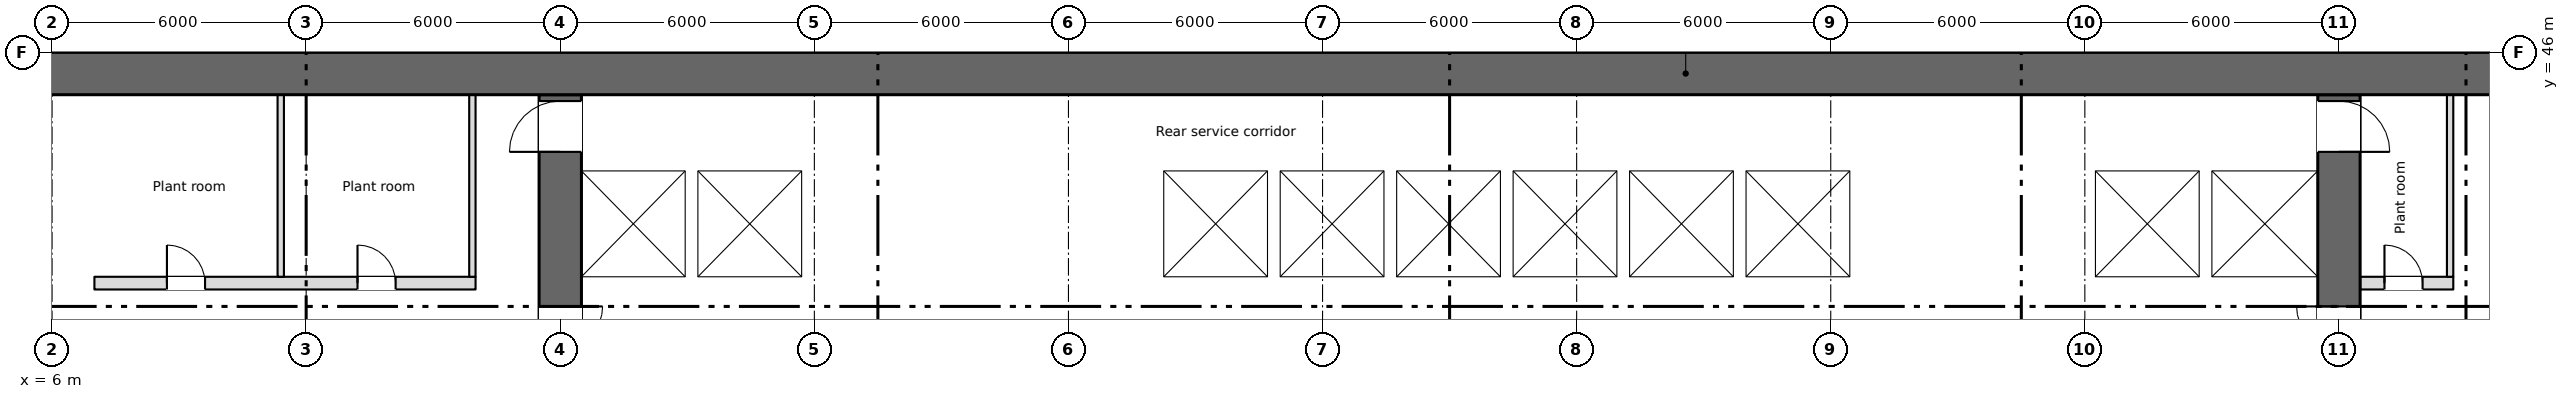
"""IFC4 building model, lengths in metres.
Left out: names, types, materials, properties, quantities, classifications, styles, units other than length and angle.
Written with IfcOpenShell. Run it as: python <this file> out.ifc"""

import sys

from ifc_helpers import new_model, si_unit, direction, frame, frame_2d, origin, place, context, subcontext, project, spatial, rectangle, extrude, element, fill, save


model = new_model("IFC4")
c1 = context("Model", 3, precision=1e-05, world=origin(), true_north=direction((0.0, 1.0)))
c2 = subcontext(c1, "Body", "Model", "MODEL_VIEW")
j1 = project(units=[si_unit("LENGTHUNIT", "METRE"), si_unit("PLANEANGLEUNIT", "RADIAN")], contexts=[c1])
p1 = place(None, origin())
s1 = spatial("IfcSite", under=j1, at=p1, CompositionType="ELEMENT")
p2 = place(p1, origin())
s2 = spatial("IfcBuilding", under=s1, at=p2, CompositionType="ELEMENT")
p3 = place(p2, frame((0.0, 0.0, 90.0)))
s3 = spatial("IfcBuildingStorey", under=s2, at=p3, CompositionType="ELEMENT", Elevation=90.0)
p4 = place(p3, frame((5.55, 45.5, 0.0), z_axis=(0.0, 0.0, 1.0), x_axis=(1.0, 0.0, 0.0)))
e1 = element("IfcWall", 1, at=p4, inside=s3, PredefinedType="SHEAR", context=c2, shape_type="SweptSolid", body=[
    extrude(rectangle(XDim=66.9, YDim=1.0, at=frame_2d((33.45, 0.0))), origin(), (0.0, 0.0, 1.0), 4.2),
])
p5 = place(p3, frame((6.85, 28.4, 0.0), z_axis=(0.0, 0.0, 1.0), x_axis=(0.0, 1.0, 0.0)))
e2 = element("IfcWall", 2, at=p5, inside=s3, PredefinedType="SHEAR", context=c2, shape_type="SweptSolid", body=[
    extrude(rectangle(XDim=16.6, YDim=0.3, at=frame_2d((8.3, 0.0))), origin(), (0.0, 0.0, 1.0), 4.2),
])
p6 = place(p3, frame((18.0, 28.4, 0.0), z_axis=(0.0, 0.0, 1.0), x_axis=(0.0, 1.0, 0.0)))
e3 = element("IfcWall", 3, at=p6, inside=s3, PredefinedType="SHEAR", context=c2, shape_type="SweptSolid", body=[
    extrude(rectangle(XDim=16.6, YDim=1.0, at=frame_2d((8.3, 0.0))), origin(), (0.0, 0.0, 1.0), 4.2),
])
p7 = place(p6, frame((9.6, 0.0, 0.0)))
e4 = element("IfcOpeningElement", 4, at=p7, cuts=e3, PredefinedType="OPENING", context=c2, shape_type="SweptSolid", body=[
    extrude(rectangle(XDim=2.0, YDim=2.1, at=frame_2d((1.0, 1.05))), frame((0.0, 0.51, 0.0), z_axis=(0.0, -1.0, 0.0), x_axis=(1.0, 0.0, 0.0)), (0.0, 0.0, 1.0), 1.02),
])
p8 = place(p6, frame((15.25, 0.0, 0.0)))
e5 = element("IfcOpeningElement", 5, at=p8, cuts=e3, PredefinedType="OPENING", context=c2, shape_type="SweptSolid", body=[
    extrude(rectangle(XDim=1.2, YDim=2.1, at=frame_2d((0.6, 1.05))), frame((0.0, 0.51, 0.0), z_axis=(0.0, -1.0, 0.0), x_axis=(1.0, 0.0, 0.0)), (0.0, 0.0, 1.0), 1.02),
])
p9 = place(p3, frame((60.0, 28.4, 0.0), z_axis=(0.0, 0.0, 1.0), x_axis=(0.0, 1.0, 0.0)))
e6 = element("IfcWall", 6, at=p9, inside=s3, PredefinedType="SHEAR", context=c2, shape_type="SweptSolid", body=[
    extrude(rectangle(XDim=16.6, YDim=1.0, at=frame_2d((8.3, 0.0))), origin(), (0.0, 0.0, 1.0), 4.2),
])
p10 = place(p9, frame((9.6, 0.0, 0.0)))
e7 = element("IfcOpeningElement", 7, at=p10, cuts=e6, PredefinedType="OPENING", context=c2, shape_type="SweptSolid", body=[
    extrude(rectangle(XDim=2.0, YDim=2.1, at=frame_2d((1.0, 1.05))), frame((0.0, 0.51, 0.0), z_axis=(0.0, -1.0, 0.0), x_axis=(1.0, 0.0, 0.0)), (0.0, 0.0, 1.0), 1.02),
])
p11 = place(p9, frame((15.25, 0.0, 0.0)))
e8 = element("IfcOpeningElement", 8, at=p11, cuts=e6, PredefinedType="OPENING", context=c2, shape_type="SweptSolid", body=[
    extrude(rectangle(XDim=1.2, YDim=2.1, at=frame_2d((0.6, 1.05))), frame((0.0, 0.51, 0.0), z_axis=(0.0, -1.0, 0.0), x_axis=(1.0, 0.0, 0.0)), (0.0, 0.0, 1.0), 1.02),
])
p12 = place(p3, frame((18.5, 40.55, 0.0), z_axis=(0.0, 0.0, 1.0), x_axis=(1.0, 0.0, 0.0)))
e9 = element("IfcWall", 9, at=p12, inside=s3, PredefinedType="SHEAR", context=c2, shape_type="SweptSolid", body=[
    extrude(rectangle(XDim=41.0, YDim=0.3, at=frame_2d((20.5, 0.0))), origin(), (0.0, 0.0, 1.0), 4.2),
])
p13 = place(p12, frame((6.175, 0.0, 0.0)))
e10 = element("IfcOpeningElement", 10, at=p13, cuts=e9, PredefinedType="OPENING", context=c2, shape_type="SweptSolid", body=[
    extrude(rectangle(XDim=1.1, YDim=2.1, at=frame_2d((0.55, 1.05))), frame((0.0, 0.16, 0.0), z_axis=(0.0, -1.0, 0.0), x_axis=(1.0, 0.0, 0.0)), (0.0, 0.0, 1.0), 0.32),
])
p14 = place(p12, frame((8.925, 0.0, 0.0)))
e11 = element("IfcOpeningElement", 11, at=p14, cuts=e9, PredefinedType="OPENING", context=c2, shape_type="SweptSolid", body=[
    extrude(rectangle(XDim=1.1, YDim=2.1, at=frame_2d((0.55, 1.05))), frame((0.0, 0.16, 0.0), z_axis=(0.0, -1.0, 0.0), x_axis=(1.0, 0.0, 0.0)), (0.0, 0.0, 1.0), 0.32),
])
p15 = place(p12, frame((11.675, 0.0, 0.0)))
e12 = element("IfcOpeningElement", 12, at=p15, cuts=e9, PredefinedType="OPENING", context=c2, shape_type="SweptSolid", body=[
    extrude(rectangle(XDim=1.1, YDim=2.1, at=frame_2d((0.55, 1.05))), frame((0.0, 0.16, 0.0), z_axis=(0.0, -1.0, 0.0), x_axis=(1.0, 0.0, 0.0)), (0.0, 0.0, 1.0), 0.32),
])
p16 = place(p12, frame((14.425, 0.0, 0.0)))
e13 = element("IfcOpeningElement", 13, at=p16, cuts=e9, PredefinedType="OPENING", context=c2, shape_type="SweptSolid", body=[
    extrude(rectangle(XDim=1.1, YDim=2.1, at=frame_2d((0.55, 1.05))), frame((0.0, 0.16, 0.0), z_axis=(0.0, -1.0, 0.0), x_axis=(1.0, 0.0, 0.0)), (0.0, 0.0, 1.0), 0.32),
])
p17 = place(p12, frame((17.175, 0.0, 0.0)))
e14 = element("IfcOpeningElement", 14, at=p17, cuts=e9, PredefinedType="OPENING", context=c2, shape_type="SweptSolid", body=[
    extrude(rectangle(XDim=1.1, YDim=2.1, at=frame_2d((0.55, 1.05))), frame((0.0, 0.16, 0.0), z_axis=(0.0, -1.0, 0.0), x_axis=(1.0, 0.0, 0.0)), (0.0, 0.0, 1.0), 0.32),
])
p18 = place(p12, frame((19.925, 0.0, 0.0)))
e15 = element("IfcOpeningElement", 15, at=p18, cuts=e9, PredefinedType="OPENING", context=c2, shape_type="SweptSolid", body=[
    extrude(rectangle(XDim=1.1, YDim=2.1, at=frame_2d((0.55, 1.05))), frame((0.0, 0.16, 0.0), z_axis=(0.0, -1.0, 0.0), x_axis=(1.0, 0.0, 0.0)), (0.0, 0.0, 1.0), 0.32),
])
p19 = place(p12, frame((22.675, 0.0, 0.0)))
e16 = element("IfcOpeningElement", 16, at=p19, cuts=e9, PredefinedType="OPENING", context=c2, shape_type="SweptSolid", body=[
    extrude(rectangle(XDim=1.1, YDim=2.1, at=frame_2d((0.55, 1.05))), frame((0.0, 0.16, 0.0), z_axis=(0.0, -1.0, 0.0), x_axis=(1.0, 0.0, 0.0)), (0.0, 0.0, 1.0), 0.32),
])
p20 = place(p12, frame((30.925, 0.0, 0.0)))
e17 = element("IfcOpeningElement", 17, at=p20, cuts=e9, PredefinedType="OPENING", context=c2, shape_type="SweptSolid", body=[
    extrude(rectangle(XDim=1.1, YDim=2.1, at=frame_2d((0.55, 1.05))), frame((0.0, 0.16, 0.0), z_axis=(0.0, -1.0, 0.0), x_axis=(1.0, 0.0, 0.0)), (0.0, 0.0, 1.0), 0.32),
])
p21 = place(p12, frame((33.675, 0.0, 0.0)))
e18 = element("IfcOpeningElement", 18, at=p21, cuts=e9, PredefinedType="OPENING", context=c2, shape_type="SweptSolid", body=[
    extrude(rectangle(XDim=1.1, YDim=2.1, at=frame_2d((0.55, 1.05))), frame((0.0, 0.16, 0.0), z_axis=(0.0, -1.0, 0.0), x_axis=(1.0, 0.0, 0.0)), (0.0, 0.0, 1.0), 0.32),
])
p22 = place(p12, frame((36.375, 0.0, 0.0)))
e19 = element("IfcOpeningElement", 19, at=p22, cuts=e9, PredefinedType="OPENING", context=c2, shape_type="SweptSolid", body=[
    extrude(rectangle(XDim=1.2, YDim=2.1, at=frame_2d((0.6, 1.05))), frame((0.0, 0.16, 0.0), z_axis=(0.0, -1.0, 0.0), x_axis=(1.0, 0.0, 0.0)), (0.0, 0.0, 1.0), 0.32),
])
p23 = place(p12, frame((39.15, 0.0, 0.0)))
e20 = element("IfcOpeningElement", 20, at=p23, cuts=e9, PredefinedType="OPENING", context=c2, shape_type="SweptSolid", body=[
    extrude(rectangle(XDim=1.2, YDim=2.1, at=frame_2d((0.6, 1.05))), frame((0.0, 0.16, 0.0), z_axis=(0.0, -1.0, 0.0), x_axis=(1.0, 0.0, 0.0)), (0.0, 0.0, 1.0), 0.32),
])
p24 = place(p3, frame((18.5, 43.35, 0.0), z_axis=(0.0, 0.0, 1.0), x_axis=(1.0, 0.0, 0.0)))
e21 = element("IfcWall", 21, at=p24, inside=s3, PredefinedType="SHEAR", context=c2, shape_type="SweptSolid", body=[
    extrude(rectangle(XDim=41.0, YDim=0.3, at=frame_2d((20.5, 0.0))), origin(), (0.0, 0.0, 1.0), 4.2),
])
p25 = place(p3, frame((7.0, 40.55, 0.0), z_axis=(0.0, 0.0, 1.0), x_axis=(1.0, 0.0, 0.0)))
e22 = element("IfcWall", 22, at=p25, inside=s3, PredefinedType="PARTITIONING", context=c2, shape_type="SweptSolid", body=[
    extrude(rectangle(XDim=9.0, YDim=0.3, at=frame_2d((4.5, 0.0))), origin(), (0.0, 0.0, 1.0), 4.2),
])
p26 = place(p25, frame((1.712, 0.0, 0.0)))
e23 = element("IfcOpeningElement", 23, at=p26, cuts=e22, PredefinedType="OPENING", context=c2, shape_type="SweptSolid", body=[
    extrude(rectangle(XDim=0.9, YDim=2.1, at=frame_2d((0.45, 1.05))), frame((0.0, 0.16, 0.0), z_axis=(0.0, -1.0, 0.0), x_axis=(1.0, 0.0, 0.0)), (0.0, 0.0, 1.0), 0.32),
])
p27 = place(p25, frame((6.212, 0.0, 0.0)))
e24 = element("IfcOpeningElement", 24, at=p27, cuts=e22, PredefinedType="OPENING", context=c2, shape_type="SweptSolid", body=[
    extrude(rectangle(XDim=0.9, YDim=2.1, at=frame_2d((0.45, 1.05))), frame((0.0, 0.16, 0.0), z_axis=(0.0, -1.0, 0.0), x_axis=(1.0, 0.0, 0.0)), (0.0, 0.0, 1.0), 0.32),
])
p28 = place(p3, frame((60.5, 40.55, 0.0), z_axis=(0.0, 0.0, 1.0), x_axis=(1.0, 0.0, 0.0)))
e25 = element("IfcWall", 25, at=p28, inside=s3, PredefinedType="PARTITIONING", context=c2, shape_type="SweptSolid", body=[
    extrude(rectangle(XDim=2.2, YDim=0.3, at=frame_2d((1.1, 0.0))), origin(), (0.0, 0.0, 1.0), 4.2),
])
p29 = place(p28, frame((0.575, 0.0, 0.0)))
e26 = element("IfcOpeningElement", 26, at=p29, cuts=e25, PredefinedType="OPENING", context=c2, shape_type="SweptSolid", body=[
    extrude(rectangle(XDim=0.9, YDim=2.1, at=frame_2d((0.45, 1.05))), frame((0.0, 0.16, 0.0), z_axis=(0.0, -1.0, 0.0), x_axis=(1.0, 0.0, 0.0)), (0.0, 0.0, 1.0), 0.32),
])
for number, where, z_axis, x_axis in (
    (27, (21.1, 40.7, 0.0), (0.0, 0.0, 1.0), (0.0, 1.0, 0.0)),
    (28, (23.85, 40.7, 0.0), (0.0, 0.0, 1.0), (0.0, 1.0, 0.0)),
    (29, (26.6, 40.7, 0.0), (0.0, 0.0, 1.0), (0.0, 1.0, 0.0)),
    (30, (29.35, 40.7, 0.0), (0.0, 0.0, 1.0), (0.0, 1.0, 0.0)),
    (31, (32.1, 40.7, 0.0), (0.0, 0.0, 1.0), (0.0, 1.0, 0.0)),
    (32, (34.85, 40.7, 0.0), (0.0, 0.0, 1.0), (0.0, 1.0, 0.0)),
    (33, (37.6, 40.7, 0.0), (0.0, 0.0, 1.0), (0.0, 1.0, 0.0)),
    (34, (40.35, 40.7, 0.0), (0.0, 0.0, 1.0), (0.0, 1.0, 0.0)),
    (35, (43.1, 40.7, 0.0), (0.0, 0.0, 1.0), (0.0, 1.0, 0.0)),
    (36, (45.85, 40.7, 0.0), (0.0, 0.0, 1.0), (0.0, 1.0, 0.0)),
    (37, (48.6, 40.7, 0.0), (0.0, 0.0, 1.0), (0.0, 1.0, 0.0)),
    (38, (51.35, 40.7, 0.0), (0.0, 0.0, 1.0), (0.0, 1.0, 0.0)),
    (39, (54.1, 40.7, 0.0), (0.0, 0.0, 1.0), (0.0, 1.0, 0.0)),
    (40, (56.85, 40.7, 0.0), (0.0, 0.0, 1.0), (0.0, 1.0, 0.0)),
):
    element("IfcWall", number, at=place(p3, frame(where, z_axis=z_axis, x_axis=x_axis)), inside=s3, PredefinedType="SHEAR", context=c2, shape_type="SweptSolid", body=[
        extrude(rectangle(XDim=2.5, YDim=0.3, at=frame_2d((1.25, 0.0))), origin(), (0.0, 0.0, 1.0), 4.2),
    ])
for number, where, z_axis, x_axis in (
    (41, (15.925, 40.7, 0.0), (0.0, 0.0, 1.0), (0.0, 1.0, 0.0)),
    (42, (62.625, 40.7, 0.0), (0.0, 0.0, 1.0), (0.0, 1.0, 0.0)),
    (43, (11.4, 40.7, 0.0), (0.0, 0.0, 1.0), (0.0, 1.0, 0.0)),
):
    element("IfcWall", number, at=place(p3, frame(where, z_axis=z_axis, x_axis=x_axis)), inside=s3, PredefinedType="PARTITIONING", context=c2, shape_type="SweptSolid", body=[
        extrude(rectangle(XDim=4.3, YDim=0.15, at=frame_2d((2.15, 0.0))), origin(), (0.0, 0.0, 1.0), 4.2),
    ])
p30 = place(p26, origin())
e44 = element("IfcDoor", 44, at=p30, inside=s3, OperationType="SINGLE_SWING_LEFT", PredefinedType="DOOR", context=c2, shape_type="SweptSolid", body=[
    extrude(rectangle(XDim=0.9, YDim=2.1, at=frame_2d((0.45, 1.05))), frame((0.0, 0.025, 0.0), z_axis=(0.0, -1.0, 0.0), x_axis=(1.0, 0.0, 0.0)), (0.0, 0.0, 1.0), 0.05),
])
fill(e23, e44)
p31 = place(p27, origin())
e45 = element("IfcDoor", 45, at=p31, inside=s3, OperationType="SINGLE_SWING_LEFT", PredefinedType="DOOR", context=c2, shape_type="SweptSolid", body=[
    extrude(rectangle(XDim=0.9, YDim=2.1, at=frame_2d((0.45, 1.05))), frame((0.0, 0.025, 0.0), z_axis=(0.0, -1.0, 0.0), x_axis=(1.0, 0.0, 0.0)), (0.0, 0.0, 1.0), 0.05),
])
fill(e24, e45)
p32 = place(p29, origin())
e46 = element("IfcDoor", 46, at=p32, inside=s3, OperationType="SINGLE_SWING_LEFT", PredefinedType="DOOR", context=c2, shape_type="SweptSolid", body=[
    extrude(rectangle(XDim=0.9, YDim=2.1, at=frame_2d((0.45, 1.05))), frame((0.0, 0.025, 0.0), z_axis=(0.0, -1.0, 0.0), x_axis=(1.0, 0.0, 0.0)), (0.0, 0.0, 1.0), 0.05),
])
fill(e26, e46)
p33 = place(p13, origin())
e47 = element("IfcDoor", 47, at=p33, inside=s3, OperationType="SLIDING_TO_LEFT", PredefinedType="DOOR", context=c2, shape_type="SweptSolid", body=[
    extrude(rectangle(XDim=1.1, YDim=2.1, at=frame_2d((0.55, 1.05))), frame((0.0, 0.025, 0.0), z_axis=(0.0, -1.0, 0.0), x_axis=(1.0, 0.0, 0.0)), (0.0, 0.0, 1.0), 0.05),
])
fill(e10, e47)
p34 = place(p14, origin())
e48 = element("IfcDoor", 48, at=p34, inside=s3, OperationType="SLIDING_TO_LEFT", PredefinedType="DOOR", context=c2, shape_type="SweptSolid", body=[
    extrude(rectangle(XDim=1.1, YDim=2.1, at=frame_2d((0.55, 1.05))), frame((0.0, 0.025, 0.0), z_axis=(0.0, -1.0, 0.0), x_axis=(1.0, 0.0, 0.0)), (0.0, 0.0, 1.0), 0.05),
])
fill(e11, e48)
p35 = place(p15, origin())
e49 = element("IfcDoor", 49, at=p35, inside=s3, OperationType="SLIDING_TO_LEFT", PredefinedType="DOOR", context=c2, shape_type="SweptSolid", body=[
    extrude(rectangle(XDim=1.1, YDim=2.1, at=frame_2d((0.55, 1.05))), frame((0.0, 0.025, 0.0), z_axis=(0.0, -1.0, 0.0), x_axis=(1.0, 0.0, 0.0)), (0.0, 0.0, 1.0), 0.05),
])
fill(e12, e49)
p36 = place(p16, origin())
e50 = element("IfcDoor", 50, at=p36, inside=s3, OperationType="SLIDING_TO_LEFT", PredefinedType="DOOR", context=c2, shape_type="SweptSolid", body=[
    extrude(rectangle(XDim=1.1, YDim=2.1, at=frame_2d((0.55, 1.05))), frame((0.0, 0.025, 0.0), z_axis=(0.0, -1.0, 0.0), x_axis=(1.0, 0.0, 0.0)), (0.0, 0.0, 1.0), 0.05),
])
fill(e13, e50)
p37 = place(p17, origin())
e51 = element("IfcDoor", 51, at=p37, inside=s3, OperationType="SLIDING_TO_LEFT", PredefinedType="DOOR", context=c2, shape_type="SweptSolid", body=[
    extrude(rectangle(XDim=1.1, YDim=2.1, at=frame_2d((0.55, 1.05))), frame((0.0, 0.025, 0.0), z_axis=(0.0, -1.0, 0.0), x_axis=(1.0, 0.0, 0.0)), (0.0, 0.0, 1.0), 0.05),
])
fill(e14, e51)
p38 = place(p18, origin())
e52 = element("IfcDoor", 52, at=p38, inside=s3, OperationType="SLIDING_TO_LEFT", PredefinedType="DOOR", context=c2, shape_type="SweptSolid", body=[
    extrude(rectangle(XDim=1.1, YDim=2.1, at=frame_2d((0.55, 1.05))), frame((0.0, 0.025, 0.0), z_axis=(0.0, -1.0, 0.0), x_axis=(1.0, 0.0, 0.0)), (0.0, 0.0, 1.0), 0.05),
])
fill(e15, e52)
p39 = place(p19, origin())
e53 = element("IfcDoor", 53, at=p39, inside=s3, OperationType="SLIDING_TO_LEFT", PredefinedType="DOOR", context=c2, shape_type="SweptSolid", body=[
    extrude(rectangle(XDim=1.1, YDim=2.1, at=frame_2d((0.55, 1.05))), frame((0.0, 0.025, 0.0), z_axis=(0.0, -1.0, 0.0), x_axis=(1.0, 0.0, 0.0)), (0.0, 0.0, 1.0), 0.05),
])
fill(e16, e53)
p40 = place(p20, origin())
e54 = element("IfcDoor", 54, at=p40, inside=s3, OperationType="SLIDING_TO_LEFT", PredefinedType="DOOR", context=c2, shape_type="SweptSolid", body=[
    extrude(rectangle(XDim=1.1, YDim=2.1, at=frame_2d((0.55, 1.05))), frame((0.0, 0.025, 0.0), z_axis=(0.0, -1.0, 0.0), x_axis=(1.0, 0.0, 0.0)), (0.0, 0.0, 1.0), 0.05),
])
fill(e17, e54)
p41 = place(p21, origin())
e55 = element("IfcDoor", 55, at=p41, inside=s3, OperationType="SLIDING_TO_LEFT", PredefinedType="DOOR", context=c2, shape_type="SweptSolid", body=[
    extrude(rectangle(XDim=1.1, YDim=2.1, at=frame_2d((0.55, 1.05))), frame((0.0, 0.025, 0.0), z_axis=(0.0, -1.0, 0.0), x_axis=(1.0, 0.0, 0.0)), (0.0, 0.0, 1.0), 0.05),
])
fill(e18, e55)
p42 = place(p22, origin())
e56 = element("IfcDoor", 56, at=p42, inside=s3, OperationType="SLIDING_TO_LEFT", PredefinedType="DOOR", context=c2, shape_type="SweptSolid", body=[
    extrude(rectangle(XDim=1.2, YDim=2.1, at=frame_2d((0.6, 1.05))), frame((0.0, 0.025, 0.0), z_axis=(0.0, -1.0, 0.0), x_axis=(1.0, 0.0, 0.0)), (0.0, 0.0, 1.0), 0.05),
])
fill(e19, e56)
p43 = place(p23, origin())
e57 = element("IfcDoor", 57, at=p43, inside=s3, OperationType="SLIDING_TO_LEFT", PredefinedType="DOOR", context=c2, shape_type="SweptSolid", body=[
    extrude(rectangle(XDim=1.2, YDim=2.1, at=frame_2d((0.6, 1.05))), frame((0.0, 0.025, 0.0), z_axis=(0.0, -1.0, 0.0), x_axis=(1.0, 0.0, 0.0)), (0.0, 0.0, 1.0), 0.05),
])
fill(e20, e57)
p44 = place(p7, origin())
e58 = element("IfcDoor", 58, at=p44, inside=s3, OperationType="DOUBLE_DOOR_SINGLE_SWING", PredefinedType="DOOR", context=c2, shape_type="SweptSolid", body=[
    extrude(rectangle(XDim=2.0, YDim=2.1, at=frame_2d((1.0, 1.05))), frame((0.0, 0.025, 0.0), z_axis=(0.0, -1.0, 0.0), x_axis=(1.0, 0.0, 0.0)), (0.0, 0.0, 1.0), 0.05),
])
fill(e4, e58)
p45 = place(p10, origin())
e59 = element("IfcDoor", 59, at=p45, inside=s3, OperationType="DOUBLE_DOOR_SINGLE_SWING", PredefinedType="DOOR", context=c2, shape_type="SweptSolid", body=[
    extrude(rectangle(XDim=2.0, YDim=2.1, at=frame_2d((1.0, 1.05))), frame((0.0, 0.025, 0.0), z_axis=(0.0, -1.0, 0.0), x_axis=(1.0, 0.0, 0.0)), (0.0, 0.0, 1.0), 0.05),
])
fill(e7, e59)
p46 = place(p8, origin())
e60 = element("IfcDoor", 60, at=p46, inside=s3, OperationType="SINGLE_SWING_LEFT", PredefinedType="DOOR", context=c2, shape_type="SweptSolid", body=[
    extrude(rectangle(XDim=1.2, YDim=2.1, at=frame_2d((0.6, 1.05))), frame((0.0, 0.025, 0.0), z_axis=(0.0, -1.0, 0.0), x_axis=(1.0, 0.0, 0.0)), (0.0, 0.0, 1.0), 0.05),
])
fill(e5, e60)
p47 = place(p11, origin())
e61 = element("IfcDoor", 61, at=p47, inside=s3, OperationType="SINGLE_SWING_LEFT", PredefinedType="DOOR", context=c2, shape_type="SweptSolid", body=[
    extrude(rectangle(XDim=1.2, YDim=2.1, at=frame_2d((0.6, 1.05))), frame((0.0, 0.025, 0.0), z_axis=(0.0, -1.0, 0.0), x_axis=(1.0, 0.0, 0.0)), (0.0, 0.0, 1.0), 0.05),
])
fill(e8, e61)
save(model, sys.argv[1])
